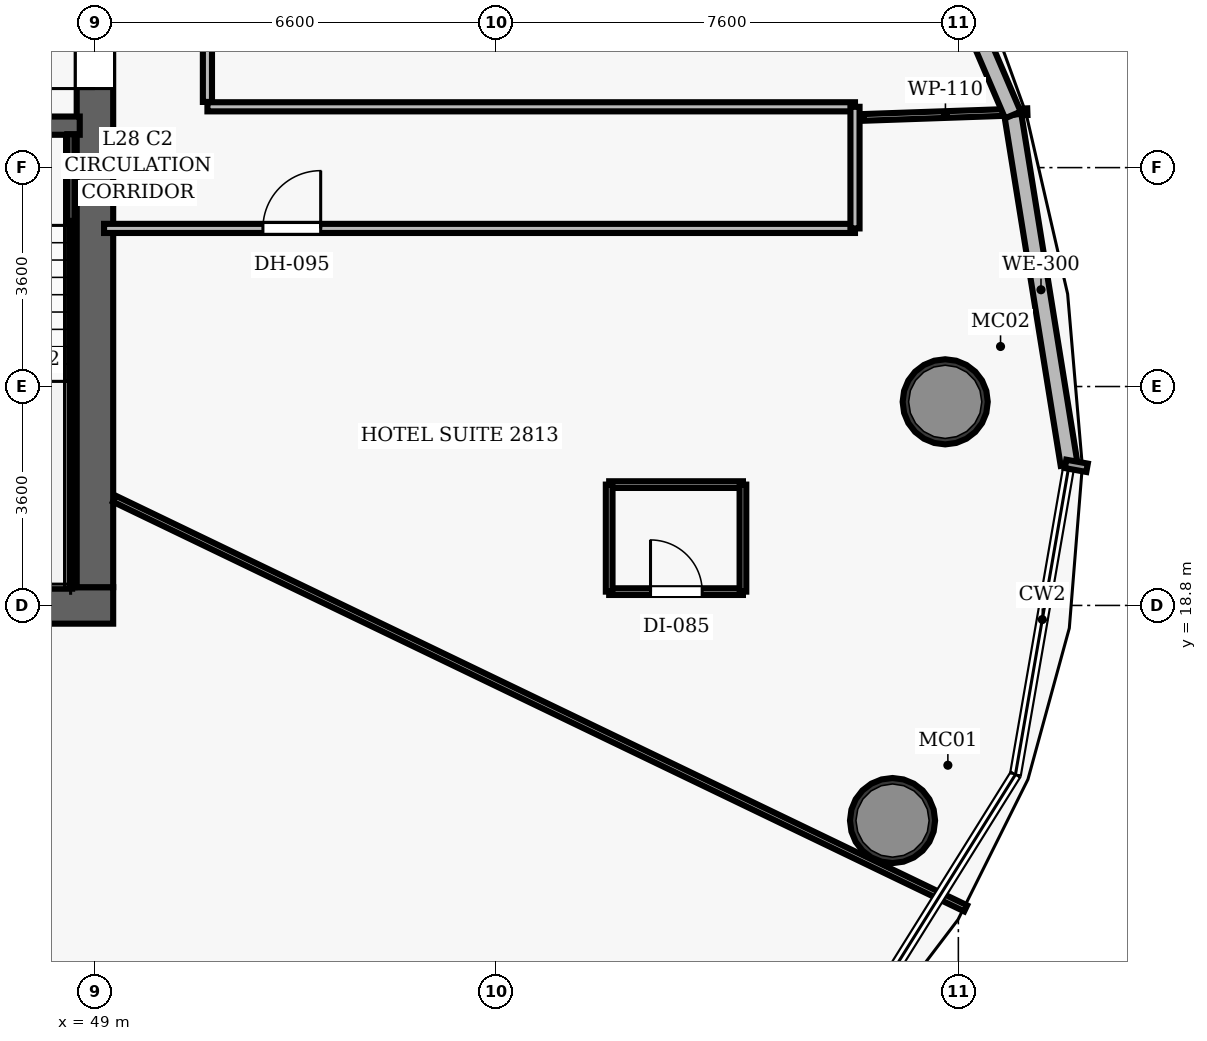
"""IFC4 building model, lengths in metres.
Left out: names, types, materials, properties, quantities, classifications, styles, units other than length and angle.
Written with IfcOpenShell. Run it as: python <this file> out.ifc"""

import sys

from ifc_helpers import new_model, si_unit, direction, frame, frame_2d, origin, origin_2d, place, context, subcontext, project, spatial, rectangle, hollow_circle, extrude, element, fill, save


model = new_model("IFC4")
c1 = context("Model", 3, precision=1e-05, world=origin(), true_north=direction((0.0, 1.0)))
c2 = subcontext(c1, "Body", "Model", "MODEL_VIEW")
j1 = project(units=[si_unit("LENGTHUNIT", "METRE"), si_unit("PLANEANGLEUNIT", "RADIAN")], contexts=[c1])
p1 = place(None, origin())
s1 = spatial("IfcSite", under=j1, at=p1, CompositionType="ELEMENT")
p2 = place(p1, origin())
s2 = spatial("IfcBuilding", under=s1, at=p2, CompositionType="ELEMENT")
p3 = place(p2, frame((0.0, 0.0, 116.8)))
s3 = spatial("IfcBuildingStorey", under=s2, at=p3, CompositionType="ELEMENT", Elevation=116.8)
p4 = place(p3, frame((26.7, 18.8, 0.0), z_axis=(0.0, 0.0, 1.0), x_axis=(1.0, 0.0, 0.0)))
e1 = element("IfcWall", 1, at=p4, inside=s3, PredefinedType="SHEAR", context=c2, shape_type="SweptSolid", body=[
    extrude(rectangle(XDim=22.6, YDim=0.6, at=frame_2d((11.3, 0.0))), origin(), (0.0, 0.0, 1.0), 3.5),
])
p5 = place(p4, frame((14.52, 0.0, 0.0)))
e2 = element("IfcOpeningElement", 2, at=p5, cuts=e1, PredefinedType="OPENING", context=c2, shape_type="SweptSolid", body=[
    extrude(rectangle(XDim=1.05, YDim=2.15, at=frame_2d((0.525, 1.075))), frame((0.0, 0.31, 0.0), z_axis=(0.0, -1.0, 0.0), x_axis=(1.0, 0.0, 0.0)), (0.0, 0.0, 1.0), 0.62),
])
p6 = place(p3, frame((49.0, 19.1, 0.0), z_axis=(0.0, 0.0, 1.0), x_axis=(0.0, 1.0, 0.0)))
e3 = element("IfcWall", 3, at=p6, inside=s3, PredefinedType="SHEAR", context=c2, shape_type="SweptSolid", body=[
    extrude(rectangle(XDim=13.8, YDim=0.6, at=frame_2d((6.9, 0.0))), origin(), (0.0, 0.0, 1.0), 3.5),
])
p7 = place(p6, frame((8.2, 0.0, 0.0)))
e4 = element("IfcOpeningElement", 4, at=p7, cuts=e3, PredefinedType="OPENING", context=c2, shape_type="SweptSolid", body=[
    extrude(rectangle(XDim=1.05, YDim=2.15, at=frame_2d((0.525, 1.075))), frame((0.0, 0.31, 0.0), z_axis=(0.0, -1.0, 0.0), x_axis=(1.0, 0.0, 0.0)), (0.0, 0.0, 1.0), 0.62),
])
for number, where, z_axis, x_axis in (
    (5, (62.118, 15.262, 0.0), (0.0, 0.0, 1.0), (1.0, 0.0, 0.0)),
    (6, (62.984, 22.148, 0.0), (0.0, 0.0, 1.0), (1.0, 0.0, 0.0)),
):
    element("IfcColumn", number, at=place(p3, frame(where, z_axis=z_axis, x_axis=x_axis)), inside=s3, PredefinedType="COLUMN", context=c2, shape_type="SweptSolid", body=[
        extrude(hollow_circle(Radius=0.7, WallThickness=0.055, at=origin_2d()), origin(), (0.0, 0.0, 1.0), 3.5),
    ])
p8 = place(p3, frame((45.08, 26.69, 0.0), z_axis=(0.0, 0.0, 1.0), x_axis=(1.0, 0.0, 0.0)))
e7 = element("IfcWall", 7, at=p8, inside=s3, PredefinedType="SHEAR", context=c2, shape_type="SweptSolid", body=[
    extrude(rectangle(XDim=3.67, YDim=0.3, at=frame_2d((1.835, 0.0))), origin(), (0.0, 0.0, 1.0), 3.5),
])
p9 = place(p8, frame((1.05, 0.0, 0.0)))
e8 = element("IfcOpeningElement", 8, at=p9, cuts=e7, PredefinedType="OPENING", context=c2, shape_type="SweptSolid", body=[
    extrude(rectangle(XDim=1.1, YDim=2.15, at=frame_2d((0.55, 1.075))), frame((0.0, 0.16, 0.0), z_axis=(0.0, -1.0, 0.0), x_axis=(1.0, 0.0, 0.0)), (0.0, 0.0, 1.0), 0.32),
])
p10 = place(p3, frame((48.605, 19.1, 0.0), z_axis=(0.0, 0.0, 1.0), x_axis=(0.0, 1.0, 0.0)))
e9 = element("IfcWall", 9, at=p10, inside=s3, PredefinedType="SHEAR", context=c2, shape_type="SweptSolid", body=[
    extrude(rectangle(XDim=7.45, YDim=0.12, at=frame_2d((3.725, 0.0))), origin(), (0.0, 0.0, 1.0), 3.5),
])
p11 = place(p3, frame((45.51, 19.16, 0.0), z_axis=(0.0, 0.0, 1.0), x_axis=(1.0, 0.0, 0.0)))
e10 = element("IfcWall", 10, at=p11, inside=s3, PredefinedType="SHEAR", context=c2, shape_type="SweptSolid", body=[
    extrude(rectangle(XDim=3.095, YDim=0.12, at=frame_2d((1.547, 0.0))), origin(), (0.0, 0.0, 1.0), 3.5),
])
p12 = place(p3, frame((50.85, 27.08, 0.0), z_axis=(0.0, 0.0, 1.0), x_axis=(0.0, 1.0, 0.0)))
e11 = element("IfcWall", 11, at=p12, inside=s3, PredefinedType="PARTITIONING", context=c2, shape_type="SweptSolid", body=[
    extrude(rectangle(XDim=8.12, YDim=0.15, at=frame_2d((4.06, 0.0))), origin(), (0.0, 0.0, 1.0), 2.675),
])
p13 = place(p12, frame((1.179, 0.0, 0.0)))
e12 = element("IfcOpeningElement", 12, at=p13, cuts=e11, PredefinedType="OPENING", context=c2, shape_type="SweptSolid", body=[
    extrude(rectangle(XDim=0.95, YDim=2.15, at=frame_2d((0.475, 1.075))), frame((0.0, 0.085, 0.0), z_axis=(0.0, -1.0, 0.0), x_axis=(1.0, 0.0, 0.0)), (0.0, 0.0, 1.0), 0.17),
])
p14 = place(p3, frame((50.85, 27.0, 0.0), z_axis=(0.0, 0.0, 1.0), x_axis=(1.0, 0.0, 0.0)))
e13 = element("IfcWall", 13, at=p14, inside=s3, PredefinedType="PARTITIONING", context=c2, shape_type="SweptSolid", body=[
    extrude(rectangle(XDim=10.65, YDim=0.15, at=frame_2d((5.325, 0.0))), origin(), (0.0, 0.0, 1.0), 2.675),
])
p15 = place(p3, frame((49.15, 25.0, 0.0), z_axis=(0.0, 0.0, 1.0), x_axis=(1.0, 0.0, 0.0)))
e14 = element("IfcWall", 14, at=p15, inside=s3, PredefinedType="PARTITIONING", context=c2, shape_type="SweptSolid", body=[
    extrude(rectangle(XDim=12.35, YDim=0.15, at=frame_2d((6.175, 0.0))), origin(), (0.0, 0.0, 1.0), 2.675),
])
p16 = place(p15, frame((2.613, 0.0, 0.0)))
e15 = element("IfcOpeningElement", 15, at=p16, cuts=e14, PredefinedType="OPENING", context=c2, shape_type="SweptSolid", body=[
    extrude(rectangle(XDim=0.95, YDim=2.15, at=frame_2d((0.475, 1.075))), frame((0.0, 0.085, 0.0), z_axis=(0.0, -1.0, 0.0), x_axis=(1.0, 0.0, 0.0)), (0.0, 0.0, 1.0), 0.17),
])
p17 = place(p3, frame((61.5, 25.0, 0.0), z_axis=(0.0, 0.0, 1.0), x_axis=(0.0, 1.0, 0.0)))
e16 = element("IfcWall", 16, at=p17, inside=s3, PredefinedType="PARTITIONING", context=c2, shape_type="SweptSolid", body=[
    extrude(rectangle(XDim=2.0, YDim=0.15, at=frame_2d((1.0, 0.0))), origin(), (0.0, 0.0, 1.0), 2.675),
])
p18 = place(p3, frame((61.64, 26.825, 0.0), z_axis=(0.0, 0.0, 1.0), x_axis=(0.999389106182, 0.03494874026, 0.0)))
e17 = element("IfcWall", 17, at=p18, inside=s3, PredefinedType="PARTITIONING", context=c2, shape_type="SweptSolid", body=[
    extrude(rectangle(XDim=2.697, YDim=0.11, at=frame_2d((1.348, 0.0))), origin(), (0.0, 0.0, 1.0), 2.675),
])
p19 = place(p3, frame((43.588, 18.48, 0.0), z_axis=(0.0, 0.0, 1.0), x_axis=(0.596440621001, -0.802657203057, 0.0)))
e18 = element("IfcWall", 18, at=p19, inside=s3, PredefinedType="PARTITIONING", context=c2, shape_type="SweptSolid", body=[
    extrude(rectangle(XDim=15.841, YDim=0.11, at=frame_2d((7.92, 0.0))), origin(), (0.0, 0.0, 1.0), 2.675),
])
p20 = place(p3, frame((49.32, 20.554, 0.0), z_axis=(0.0, 0.0, 1.0), x_axis=(0.901134026531, -0.433540616583, 0.0)))
e19 = element("IfcWall", 19, at=p20, inside=s3, PredefinedType="PARTITIONING", context=c2, shape_type="SweptSolid", body=[
    extrude(rectangle(XDim=15.536, YDim=0.11, at=frame_2d((7.768, 0.0))), origin(), (0.0, 0.0, 1.0), 2.675),
])
p21 = place(p3, frame((57.457, 19.027, 0.0), z_axis=(0.0, 0.0, 1.0), x_axis=(1.0, 0.0, 0.0)))
e20 = element("IfcWall", 20, at=p21, inside=s3, PredefinedType="PARTITIONING", context=c2, shape_type="SweptSolid", body=[
    extrude(rectangle(XDim=2.2, YDim=0.11, at=frame_2d((1.1, 0.0))), origin(), (0.0, 0.0, 1.0), 2.675),
])
p22 = place(p21, frame((0.68, 0.0, 0.0)))
e21 = element("IfcOpeningElement", 21, at=p22, cuts=e20, PredefinedType="OPENING", context=c2, shape_type="SweptSolid", body=[
    extrude(rectangle(XDim=0.85, YDim=2.1, at=frame_2d((0.425, 1.05))), frame((0.0, 0.065, 0.0), z_axis=(0.0, -1.0, 0.0), x_axis=(1.0, 0.0, 0.0)), (0.0, 0.0, 1.0), 0.13),
])
p23 = place(p3, frame((57.457, 20.787, 0.0), z_axis=(0.0, 0.0, 1.0), x_axis=(1.0, 0.0, 0.0)))
e22 = element("IfcWall", 22, at=p23, inside=s3, PredefinedType="PARTITIONING", context=c2, shape_type="SweptSolid", body=[
    extrude(rectangle(XDim=2.2, YDim=0.11, at=frame_2d((1.1, 0.0))), origin(), (0.0, 0.0, 1.0), 2.675),
])
for number, where, z_axis, x_axis in (
    (23, (57.457, 19.027, 0.0), (0.0, 0.0, 1.0), (0.0, 1.0, 0.0)),
    (24, (59.657, 19.027, 0.0), (0.0, 0.0, 1.0), (0.0, 1.0, 0.0)),
):
    element("IfcWall", number, at=place(p3, frame(where, z_axis=z_axis, x_axis=x_axis)), inside=s3, PredefinedType="PARTITIONING", context=c2, shape_type="SweptSolid", body=[
        extrude(rectangle(XDim=1.76, YDim=0.11, at=frame_2d((0.88, 0.0))), origin(), (0.0, 0.0, 1.0), 2.675),
    ])
p24 = place(p3, frame((64.096, 26.866, 0.0), z_axis=(0.0, 0.0, 1.0), x_axis=(0.158909460881, -0.987293159726, 0.0)))
e25 = element("IfcWall", 25, at=p24, inside=s3, PredefinedType="SOLIDWALL", context=c2, shape_type="SweptSolid", body=[
    extrude(rectangle(XDim=5.823, YDim=0.28, at=frame_2d((2.911, 0.0))), origin(), (0.0, 0.0, 1.0), 3.26),
])
p25 = place(p3, frame((61.472, 32.992, 0.0), z_axis=(0.0, 0.0, 1.0), x_axis=(0.393733615398, -0.919224586326, 0.0)))
e26 = element("IfcWall", 26, at=p25, inside=s3, PredefinedType="SOLIDWALL", context=c2, shape_type="SweptSolid", body=[
    extrude(rectangle(XDim=6.665, YDim=0.28, at=frame_2d((3.333, 0.0))), origin(), (0.0, 0.0, 1.0), 3.26),
])
p26 = place(p7, origin())
e27 = element("IfcDoor", 27, at=p26, inside=s3, OperationType="SINGLE_SWING_LEFT", PredefinedType="DOOR", context=c2, shape_type="SweptSolid", body=[
    extrude(rectangle(XDim=1.05, YDim=2.15, at=frame_2d((0.525, 1.075))), frame((0.0, 0.025, 0.0), z_axis=(0.0, -1.0, 0.0), x_axis=(1.0, 0.0, 0.0)), (0.0, 0.0, 1.0), 0.05),
])
fill(e4, e27)
p27 = place(p16, origin())
e28 = element("IfcDoor", 28, at=p27, inside=s3, OperationType="SINGLE_SWING_RIGHT", PredefinedType="DOOR", context=c2, shape_type="SweptSolid", body=[
    extrude(rectangle(XDim=0.95, YDim=2.15, at=frame_2d((0.475, 1.075))), frame((0.0, 0.025, 0.0), z_axis=(0.0, -1.0, 0.0), x_axis=(1.0, 0.0, 0.0)), (0.0, 0.0, 1.0), 0.05),
])
fill(e15, e28)
p28 = place(p22, origin())
e29 = element("IfcDoor", 29, at=p28, inside=s3, OperationType="SINGLE_SWING_LEFT", PredefinedType="DOOR", context=c2, shape_type="SweptSolid", body=[
    extrude(rectangle(XDim=0.85, YDim=2.1, at=frame_2d((0.425, 1.05))), frame((0.0, 0.025, 0.0), z_axis=(0.0, -1.0, 0.0), x_axis=(1.0, 0.0, 0.0)), (0.0, 0.0, 1.0), 0.05),
])
fill(e21, e29)
save(model, sys.argv[1])
